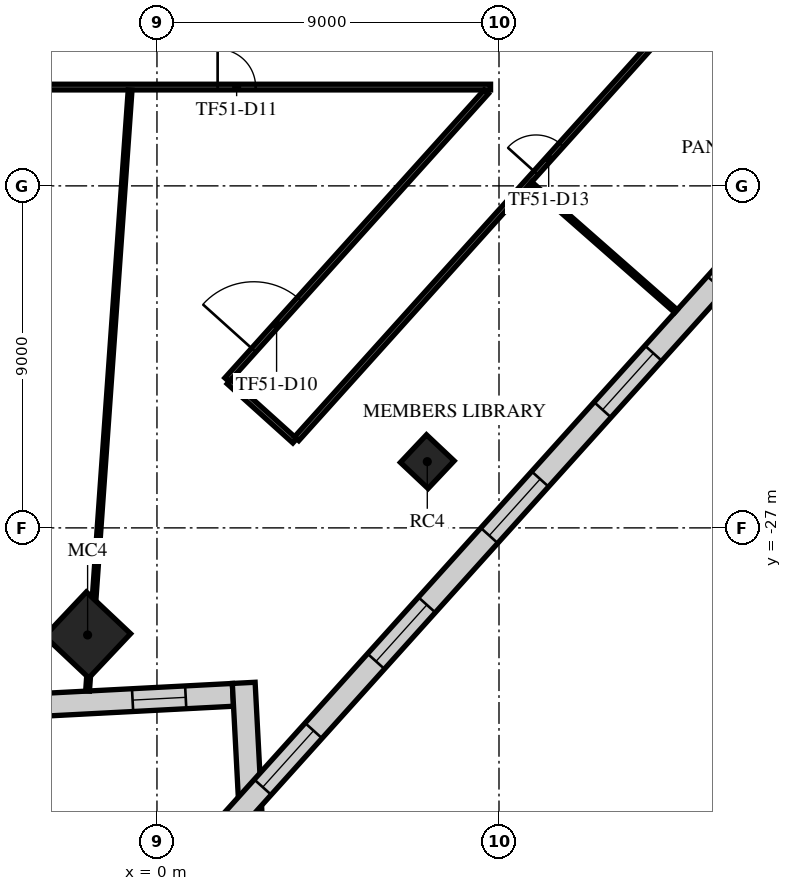
"""IFC4 building model, lengths in metres.
Left out: names, types, materials, properties, quantities, classifications, styles, units other than length and angle.
Written with IfcOpenShell. Run it as: python <this file> out.ifc"""

import sys

from ifc_helpers import new_model, si_unit, direction, frame, frame_2d, origin, origin_2d, place, context, subcontext, project, spatial, rectangle, extrude, element, fill, save


model = new_model("IFC4")
c1 = context("Model", 3, precision=1e-05, world=origin(), true_north=direction((0.0, 1.0)))
c2 = subcontext(c1, "Body", "Model", "MODEL_VIEW")
j1 = project(units=[si_unit("LENGTHUNIT", "METRE"), si_unit("PLANEANGLEUNIT", "RADIAN")], contexts=[c1])
p1 = place(None, origin())
s1 = spatial("IfcSite", under=j1, at=p1, CompositionType="ELEMENT")
p2 = place(p1, origin())
s2 = spatial("IfcBuilding", under=s1, at=p2, CompositionType="ELEMENT")
p3 = place(p2, frame((0.0, 0.0, 217.3)))
s3 = spatial("IfcBuildingStorey", under=s2, at=p3, CompositionType="ELEMENT", Elevation=217.3)
p4 = place(p3, frame((-1.825, -29.818, 0.0), z_axis=(0.0, 0.0, 1.0), x_axis=(0.685916152371, 0.727680583715, 0.0)))
e1 = element("IfcColumn", 1, at=p4, inside=s3, PredefinedType="COLUMN", context=c2, shape_type="SweptSolid", body=[
    extrude(rectangle(XDim=1.6, YDim=1.6, at=origin_2d()), origin(), (0.0, 0.0, 1.0), 4.0),
])
p5 = place(p3, frame((7.113, -25.257, 0.0), z_axis=(0.0, 0.0, 1.0), x_axis=(0.685916152371, 0.727680583715, 0.0)))
e2 = element("IfcColumn", 2, at=p5, inside=s3, PredefinedType="COLUMN", context=c2, shape_type="SweptSolid", body=[
    extrude(rectangle(XDim=1.0, YDim=1.0, at=origin_2d()), origin(), (0.0, 0.0, 1.0), 4.0),
])
p6 = place(p3, frame((-5.768, -31.801, 0.0), z_axis=(0.0, 0.0, 1.0), x_axis=(0.998630200543, 0.052323250701, 0.0)))
e3 = element("IfcWall", 3, at=p6, inside=s3, PredefinedType="STANDARD", context=c2, shape_type="SweptSolid", body=[
    extrude(rectangle(XDim=7.778, YDim=0.6, at=frame_2d((3.889, 0.0))), origin(), (0.0, 0.0, 1.0), 3.62),
])
p7 = place(p6, frame((1.244, 0.0, 0.9)))
e4 = element("IfcOpeningElement", 4, at=p7, cuts=e3, PredefinedType="OPENING", context=c2, shape_type="SweptSolid", body=[
    extrude(rectangle(XDim=1.4, YDim=2.1, at=frame_2d((0.7, 1.05))), frame((0.0, 0.31, 0.0), z_axis=(0.0, -1.0, 0.0), x_axis=(1.0, 0.0, 0.0)), (0.0, 0.0, 1.0), 0.62),
])
p8 = place(p6, frame((5.134, 0.0, 0.9)))
e5 = element("IfcOpeningElement", 5, at=p8, cuts=e3, PredefinedType="OPENING", context=c2, shape_type="SweptSolid", body=[
    extrude(rectangle(XDim=1.4, YDim=2.1, at=frame_2d((0.7, 1.05))), frame((0.0, 0.31, 0.0), z_axis=(0.0, -1.0, 0.0), x_axis=(1.0, 0.0, 0.0)), (0.0, 0.0, 1.0), 0.62),
])
p9 = place(p3, frame((2.283, -31.078, 0.0), z_axis=(0.0, 0.0, 1.0), x_axis=(0.05236228724, -0.998628154457, 0.0)))
e6 = element("IfcWall", 6, at=p9, inside=s3, PredefinedType="STANDARD", context=c2, shape_type="SweptSolid", body=[
    extrude(rectangle(XDim=3.847, YDim=0.6, at=frame_2d((1.923, 0.0))), origin(), (0.0, 0.0, 1.0), 3.62),
])
p10 = place(p3, frame((1.962, -34.735, 0.0), z_axis=(0.0, 0.0, 1.0), x_axis=(0.669133181838, 0.743142506497, 0.0)))
e7 = element("IfcWall", 7, at=p10, inside=s3, PredefinedType="STANDARD", context=c2, shape_type="SweptSolid", body=[
    extrude(rectangle(XDim=49.0, YDim=0.6, at=frame_2d((24.5, 0.0))), origin(), (0.0, 0.0, 1.0), 3.62),
])
p11 = place(p10, frame((1.227, 0.0, 0.9)))
e8 = element("IfcOpeningElement", 8, at=p11, cuts=e7, PredefinedType="OPENING", context=c2, shape_type="SweptSolid", body=[
    extrude(rectangle(XDim=2.0, YDim=2.1, at=frame_2d((1.0, 1.05))), frame((0.0, 0.31, 0.0), z_axis=(0.0, -1.0, 0.0), x_axis=(1.0, 0.0, 0.0)), (0.0, 0.0, 1.0), 0.62),
])
p12 = place(p10, frame((5.682, 0.0, 0.9)))
e9 = element("IfcOpeningElement", 9, at=p12, cuts=e7, PredefinedType="OPENING", context=c2, shape_type="SweptSolid", body=[
    extrude(rectangle(XDim=2.0, YDim=2.1, at=frame_2d((1.0, 1.05))), frame((0.0, 0.31, 0.0), z_axis=(0.0, -1.0, 0.0), x_axis=(1.0, 0.0, 0.0)), (0.0, 0.0, 1.0), 0.62),
])
p13 = place(p10, frame((10.136, 0.0, 0.9)))
e10 = element("IfcOpeningElement", 10, at=p13, cuts=e7, PredefinedType="OPENING", context=c2, shape_type="SweptSolid", body=[
    extrude(rectangle(XDim=2.0, YDim=2.1, at=frame_2d((1.0, 1.05))), frame((0.0, 0.31, 0.0), z_axis=(0.0, -1.0, 0.0), x_axis=(1.0, 0.0, 0.0)), (0.0, 0.0, 1.0), 0.62),
])
p14 = place(p10, frame((14.591, 0.0, 0.9)))
e11 = element("IfcOpeningElement", 11, at=p14, cuts=e7, PredefinedType="OPENING", context=c2, shape_type="SweptSolid", body=[
    extrude(rectangle(XDim=2.0, YDim=2.1, at=frame_2d((1.0, 1.05))), frame((0.0, 0.31, 0.0), z_axis=(0.0, -1.0, 0.0), x_axis=(1.0, 0.0, 0.0)), (0.0, 0.0, 1.0), 0.62),
])
p15 = place(p10, frame((19.045, 0.0, 0.9)))
e12 = element("IfcOpeningElement", 12, at=p15, cuts=e7, PredefinedType="OPENING", context=c2, shape_type="SweptSolid", body=[
    extrude(rectangle(XDim=2.0, YDim=2.1, at=frame_2d((1.0, 1.05))), frame((0.0, 0.31, 0.0), z_axis=(0.0, -1.0, 0.0), x_axis=(1.0, 0.0, 0.0)), (0.0, 0.0, 1.0), 0.62),
])
p16 = place(p10, frame((23.5, 0.0, 0.9)))
e13 = element("IfcOpeningElement", 13, at=p16, cuts=e7, PredefinedType="OPENING", context=c2, shape_type="SweptSolid", body=[
    extrude(rectangle(XDim=2.0, YDim=2.1, at=frame_2d((1.0, 1.05))), frame((0.0, 0.31, 0.0), z_axis=(0.0, -1.0, 0.0), x_axis=(1.0, 0.0, 0.0)), (0.0, 0.0, 1.0), 0.62),
])
p17 = place(p10, frame((27.955, 0.0, 0.9)))
e14 = element("IfcOpeningElement", 14, at=p17, cuts=e7, PredefinedType="OPENING", context=c2, shape_type="SweptSolid", body=[
    extrude(rectangle(XDim=2.0, YDim=2.1, at=frame_2d((1.0, 1.05))), frame((0.0, 0.31, 0.0), z_axis=(0.0, -1.0, 0.0), x_axis=(1.0, 0.0, 0.0)), (0.0, 0.0, 1.0), 0.62),
])
p18 = place(p10, frame((32.409, 0.0, 0.9)))
e15 = element("IfcOpeningElement", 15, at=p18, cuts=e7, PredefinedType="OPENING", context=c2, shape_type="SweptSolid", body=[
    extrude(rectangle(XDim=2.0, YDim=2.1, at=frame_2d((1.0, 1.05))), frame((0.0, 0.31, 0.0), z_axis=(0.0, -1.0, 0.0), x_axis=(1.0, 0.0, 0.0)), (0.0, 0.0, 1.0), 0.62),
])
p19 = place(p10, frame((36.864, 0.0, 0.9)))
e16 = element("IfcOpeningElement", 16, at=p19, cuts=e7, PredefinedType="OPENING", context=c2, shape_type="SweptSolid", body=[
    extrude(rectangle(XDim=2.0, YDim=2.1, at=frame_2d((1.0, 1.05))), frame((0.0, 0.31, 0.0), z_axis=(0.0, -1.0, 0.0), x_axis=(1.0, 0.0, 0.0)), (0.0, 0.0, 1.0), 0.62),
])
p20 = place(p10, frame((41.318, 0.0, 0.9)))
e17 = element("IfcOpeningElement", 17, at=p20, cuts=e7, PredefinedType="OPENING", context=c2, shape_type="SweptSolid", body=[
    extrude(rectangle(XDim=2.0, YDim=2.1, at=frame_2d((1.0, 1.05))), frame((0.0, 0.31, 0.0), z_axis=(0.0, -1.0, 0.0), x_axis=(1.0, 0.0, 0.0)), (0.0, 0.0, 1.0), 0.62),
])
p21 = place(p10, frame((45.773, 0.0, 0.9)))
e18 = element("IfcOpeningElement", 18, at=p21, cuts=e7, PredefinedType="OPENING", context=c2, shape_type="SweptSolid", body=[
    extrude(rectangle(XDim=2.0, YDim=2.1, at=frame_2d((1.0, 1.05))), frame((0.0, 0.31, 0.0), z_axis=(0.0, -1.0, 0.0), x_axis=(1.0, 0.0, 0.0)), (0.0, 0.0, 1.0), 0.62),
])
p22 = place(p3, frame((-7.715, -15.4, 0.0), z_axis=(0.0, 0.0, 1.0), x_axis=(1.0, 0.0, 0.0)))
e19 = element("IfcWall", 19, at=p22, inside=s3, PredefinedType="PARTITIONING", context=c2, shape_type="SweptSolid", body=[
    extrude(rectangle(XDim=16.493, YDim=0.15, at=frame_2d((8.246, 0.0))), origin(), (0.0, 0.0, 1.0), 3.17),
])
p23 = place(p22, frame((2.3, 0.0, 0.0)))
e20 = element("IfcOpeningElement", 20, at=p23, cuts=e19, PredefinedType="OPENING", context=c2, shape_type="SweptSolid", body=[
    extrude(rectangle(XDim=1.8, YDim=2.1, at=frame_2d((0.9, 1.05))), frame((0.0, 0.085, 0.0), z_axis=(0.0, -1.0, 0.0), x_axis=(1.0, 0.0, 0.0)), (0.0, 0.0, 1.0), 0.17),
])
p24 = place(p22, frame((9.311, 0.0, 0.0)))
e21 = element("IfcOpeningElement", 21, at=p24, cuts=e19, PredefinedType="OPENING", context=c2, shape_type="SweptSolid", body=[
    extrude(rectangle(XDim=1.0, YDim=2.1, at=frame_2d((0.5, 1.05))), frame((0.0, 0.085, 0.0), z_axis=(0.0, -1.0, 0.0), x_axis=(1.0, 0.0, 0.0)), (0.0, 0.0, 1.0), 0.17),
])
p25 = place(p3, frame((1.843, -23.103, 0.0), z_axis=(0.0, 0.0, 1.0), x_axis=(0.669082457394, 0.743188176176, 0.0)))
e22 = element("IfcWall", 22, at=p25, inside=s3, PredefinedType="PARTITIONING", context=c2, shape_type="SweptSolid", body=[
    extrude(rectangle(XDim=10.197, YDim=0.15, at=frame_2d((5.098, 0.0))), origin(), (0.0, 0.0, 1.0), 3.17),
])
p26 = place(p25, frame((1.05, 0.0, 0.0)))
e23 = element("IfcOpeningElement", 23, at=p26, cuts=e22, PredefinedType="OPENING", context=c2, shape_type="SweptSolid", body=[
    extrude(rectangle(XDim=1.8, YDim=2.1, at=frame_2d((0.9, 1.05))), frame((0.0, 0.085, 0.0), z_axis=(0.0, -1.0, 0.0), x_axis=(1.0, 0.0, 0.0)), (0.0, 0.0, 1.0), 0.17),
])
p27 = place(p3, frame((1.899, -23.153, 0.0), z_axis=(0.0, 0.0, 1.0), x_axis=(0.743059097408, -0.669225804761, 0.0)))
e24 = element("IfcWall", 24, at=p27, inside=s3, PredefinedType="PARTITIONING", context=c2, shape_type="SweptSolid", body=[
    extrude(rectangle(XDim=2.324, YDim=0.15, at=frame_2d((1.162, 0.0))), origin(), (0.0, 0.0, 1.0), 3.17),
])
p28 = place(p3, frame((3.676, -24.653, 0.0), z_axis=(0.0, 0.0, 1.0), x_axis=(0.669124220942, 0.743150574882, 0.0)))
e25 = element("IfcWall", 25, at=p28, inside=s3, PredefinedType="PARTITIONING", context=c2, shape_type="SweptSolid", body=[
    extrude(rectangle(XDim=31.796, YDim=0.15, at=frame_2d((15.898, 0.0))), origin(), (0.0, 0.0, 1.0), 3.17),
])
p29 = place(p28, frame((9.41, 0.0, 0.0)))
e26 = element("IfcOpeningElement", 26, at=p29, cuts=e25, PredefinedType="OPENING", context=c2, shape_type="SweptSolid", body=[
    extrude(rectangle(XDim=1.0, YDim=2.1, at=frame_2d((0.5, 1.05))), frame((0.0, 0.085, 0.0), z_axis=(0.0, -1.0, 0.0), x_axis=(1.0, 0.0, 0.0)), (0.0, 0.0, 1.0), 0.17),
])
p30 = place(p28, frame((23.981, 0.0, 0.0)))
e27 = element("IfcOpeningElement", 27, at=p30, cuts=e25, PredefinedType="OPENING", context=c2, shape_type="SweptSolid", body=[
    extrude(rectangle(XDim=1.0, YDim=2.1, at=frame_2d((0.5, 1.05))), frame((0.0, 0.085, 0.0), z_axis=(0.0, -1.0, 0.0), x_axis=(1.0, 0.0, 0.0)), (0.0, 0.0, 1.0), 0.17),
])
p31 = place(p3, frame((-1.826, -31.292, 0.0), z_axis=(0.0, 0.0, 1.0), x_axis=(0.070558791605, 0.997507622491, 0.0)))
e28 = element("IfcWall", 28, at=p31, inside=s3, PredefinedType="PARTITIONING", context=c2, shape_type="SweptSolid", body=[
    extrude(rectangle(XDim=0.353, YDim=0.1, at=frame_2d((0.177, 0.0))), origin(), (0.0, 0.0, 1.0), 3.62),
])
p32 = place(p3, frame((-1.655, -28.879, 0.0), z_axis=(0.0, 0.0, 1.0), x_axis=(0.070623224113, 0.99750306276, 0.0)))
e29 = element("IfcWall", 29, at=p32, inside=s3, PredefinedType="PARTITIONING", context=c2, shape_type="SweptSolid", body=[
    extrude(rectangle(XDim=13.434, YDim=0.1, at=frame_2d((6.717, 0.0))), origin(), (0.0, 0.0, 1.0), 3.05),
])
p33 = place(p3, frame((9.829, -17.933, 0.0), z_axis=(0.0, 0.0, 1.0), x_axis=(0.751096490624, -0.660192442984, 0.0)))
e30 = element("IfcWall", 30, at=p33, inside=s3, PredefinedType="PARTITIONING", context=c2, shape_type="SweptSolid", body=[
    extrude(rectangle(XDim=5.095, YDim=0.1, at=frame_2d((2.547, 0.0))), origin(), (0.0, 0.0, 1.0), 2.97),
])
p34 = place(p8, origin())
e31 = element("IfcWindow", 31, at=p34, inside=s3, PartitioningType="SINGLE_PANEL", PredefinedType="WINDOW", context=c2, shape_type="SweptSolid", body=[
    extrude(rectangle(XDim=1.4, YDim=2.1, at=frame_2d((0.7, 1.05))), frame((0.0, 0.03, 0.0), z_axis=(0.0, -1.0, 0.0), x_axis=(1.0, 0.0, 0.0)), (0.0, 0.0, 1.0), 0.06),
])
fill(e5, e31)
p35 = place(p11, origin())
e32 = element("IfcWindow", 32, at=p35, inside=s3, PartitioningType="SINGLE_PANEL", PredefinedType="WINDOW", context=c2, shape_type="SweptSolid", body=[
    extrude(rectangle(XDim=2.0, YDim=2.1, at=frame_2d((1.0, 1.05))), frame((0.0, 0.03, 0.0), z_axis=(0.0, -1.0, 0.0), x_axis=(1.0, 0.0, 0.0)), (0.0, 0.0, 1.0), 0.06),
])
fill(e8, e32)
p36 = place(p12, origin())
e33 = element("IfcWindow", 33, at=p36, inside=s3, PartitioningType="SINGLE_PANEL", PredefinedType="WINDOW", context=c2, shape_type="SweptSolid", body=[
    extrude(rectangle(XDim=2.0, YDim=2.1, at=frame_2d((1.0, 1.05))), frame((0.0, 0.03, 0.0), z_axis=(0.0, -1.0, 0.0), x_axis=(1.0, 0.0, 0.0)), (0.0, 0.0, 1.0), 0.06),
])
fill(e9, e33)
p37 = place(p13, origin())
e34 = element("IfcWindow", 34, at=p37, inside=s3, PartitioningType="SINGLE_PANEL", PredefinedType="WINDOW", context=c2, shape_type="SweptSolid", body=[
    extrude(rectangle(XDim=2.0, YDim=2.1, at=frame_2d((1.0, 1.05))), frame((0.0, 0.03, 0.0), z_axis=(0.0, -1.0, 0.0), x_axis=(1.0, 0.0, 0.0)), (0.0, 0.0, 1.0), 0.06),
])
fill(e10, e34)
p38 = place(p14, origin())
e35 = element("IfcWindow", 35, at=p38, inside=s3, PartitioningType="SINGLE_PANEL", PredefinedType="WINDOW", context=c2, shape_type="SweptSolid", body=[
    extrude(rectangle(XDim=2.0, YDim=2.1, at=frame_2d((1.0, 1.05))), frame((0.0, 0.03, 0.0), z_axis=(0.0, -1.0, 0.0), x_axis=(1.0, 0.0, 0.0)), (0.0, 0.0, 1.0), 0.06),
])
fill(e11, e35)
p39 = place(p26, origin())
e36 = element("IfcDoor", 36, at=p39, inside=s3, OperationType="DOUBLE_DOOR_SINGLE_SWING", PredefinedType="DOOR", context=c2, shape_type="SweptSolid", body=[
    extrude(rectangle(XDim=1.8, YDim=2.1, at=frame_2d((0.9, 1.05))), frame((0.0, 0.025, 0.0), z_axis=(0.0, -1.0, 0.0), x_axis=(1.0, 0.0, 0.0)), (0.0, 0.0, 1.0), 0.05),
])
fill(e23, e36)
p40 = place(p24, frame((1.0, 0.0, 0.0), z_axis=(0.0, 0.0, 1.0), x_axis=(-1.0, 0.0, 0.0)))
e37 = element("IfcDoor", 37, at=p40, inside=s3, OperationType="SINGLE_SWING_LEFT", PredefinedType="DOOR", context=c2, shape_type="SweptSolid", body=[
    extrude(rectangle(XDim=1.0, YDim=2.1, at=frame_2d((0.5, 1.05))), frame((0.0, 0.025, 0.0), z_axis=(0.0, -1.0, 0.0), x_axis=(1.0, 0.0, 0.0)), (0.0, 0.0, 1.0), 0.05),
])
fill(e21, e37)
p41 = place(p29, frame((1.0, 0.0, 0.0), z_axis=(0.0, 0.0, 1.0), x_axis=(-1.0, 0.0, 0.0)))
e38 = element("IfcDoor", 38, at=p41, inside=s3, OperationType="SINGLE_SWING_LEFT", PredefinedType="DOOR", context=c2, shape_type="SweptSolid", body=[
    extrude(rectangle(XDim=1.0, YDim=2.1, at=frame_2d((0.5, 1.05))), frame((0.0, 0.025, 0.0), z_axis=(0.0, -1.0, 0.0), x_axis=(1.0, 0.0, 0.0)), (0.0, 0.0, 1.0), 0.05),
])
fill(e26, e38)
save(model, sys.argv[1])
